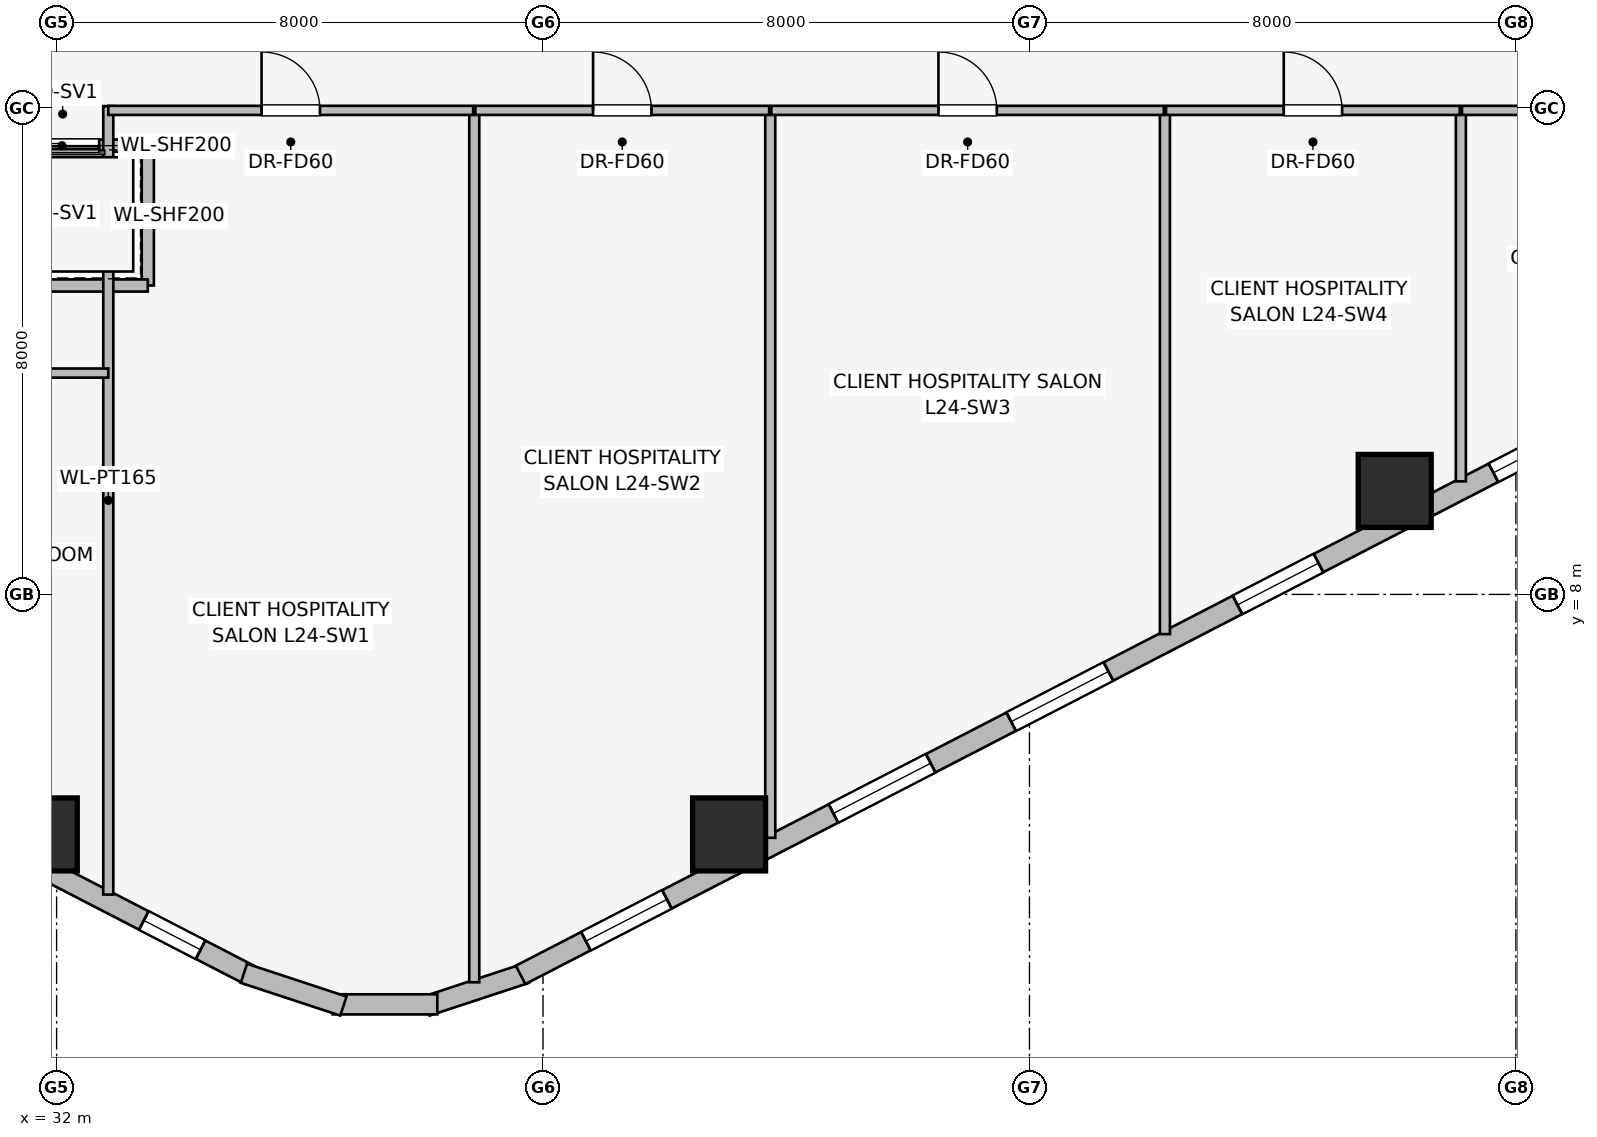
"""IFC4 building model, lengths in metres.
Left out: names, types, materials, properties, quantities, classifications, styles, units other than length and angle.
Written with IfcOpenShell. Run it as: python <this file> out.ifc"""

import sys

from ifc_helpers import new_model, si_unit, direction, frame, frame_2d, origin, origin_2d, place, context, subcontext, project, spatial, rectangle, extrude, element, fill, save


model = new_model("IFC4")
c1 = context("Model", 3, precision=1e-05, world=origin(), true_north=direction((0.0, 1.0)))
c2 = subcontext(c1, "Body", "Model", "MODEL_VIEW")
j1 = project(units=[si_unit("LENGTHUNIT", "METRE"), si_unit("PLANEANGLEUNIT", "RADIAN")], contexts=[c1])
p1 = place(None, origin())
s1 = spatial("IfcSite", under=j1, at=p1, CompositionType="ELEMENT")
p2 = place(p1, origin())
s2 = spatial("IfcBuilding", under=s1, at=p2, CompositionType="ELEMENT")
p3 = place(p2, frame((0.0, 0.0, 92.7)))
s3 = spatial("IfcBuildingStorey", under=s2, at=p3, CompositionType="ELEMENT", Elevation=92.7)
for number, where, z_axis, x_axis in (
    (1, (31.74, 4.053, 0.0), (0.0, 0.0, 1.0), (1.0, 0.0, 0.0)),
    (2, (43.06, 4.053, 0.0), (0.0, 0.0, 1.0), (1.0, 0.0, 0.0)),
    (3, (54.007, 9.702, 0.0), (0.0, 0.0, 1.0), (1.0, 0.0, 0.0)),
):
    element("IfcColumn", number, at=place(p3, frame(where, z_axis=z_axis, x_axis=x_axis)), inside=s3, PredefinedType="COLUMN", context=c2, shape_type="SweptSolid", body=[
        extrude(rectangle(XDim=1.2, YDim=1.2, at=origin_2d()), origin(), (0.0, 0.0, 1.0), 3.65),
    ])
p4 = place(p3, frame((35.169, 1.743, 0.0), z_axis=(0.0, 0.0, 1.0), x_axis=(-0.888634413993, 0.458616264721, 0.0)))
e4 = element("IfcWall", 4, at=p4, inside=s3, PredefinedType="STANDARD", context=c2, shape_type="SweptSolid", body=[
    extrude(rectangle(XDim=20.531, YDim=0.34, at=frame_2d((10.266, 0.0))), origin(), (0.0, 0.0, 1.0), 2.634),
])
p5 = place(p4, frame((0.902, 0.0, 0.75)))
e5 = element("IfcOpeningElement", 5, at=p5, cuts=e4, PredefinedType="OPENING", context=c2, shape_type="SweptSolid", body=[
    extrude(rectangle(XDim=1.05, YDim=1.4, at=frame_2d((0.525, 0.7))), frame((0.0, 0.18, 0.0), z_axis=(0.0, -1.0, 0.0), x_axis=(1.0, 0.0, 0.0)), (0.0, 0.0, 1.0), 0.36),
])
p6 = place(p4, frame((5.903, 0.0, 0.75)))
e6 = element("IfcOpeningElement", 6, at=p6, cuts=e4, PredefinedType="OPENING", context=c2, shape_type="SweptSolid", body=[
    extrude(rectangle(XDim=1.5, YDim=1.5, at=frame_2d((0.75, 0.75))), frame((0.0, 0.18, 0.0), z_axis=(0.0, -1.0, 0.0), x_axis=(1.0, 0.0, 0.0)), (0.0, 0.0, 1.0), 0.36),
])
p7 = place(p4, frame((9.516, 0.0, 0.75)))
e7 = element("IfcOpeningElement", 7, at=p7, cuts=e4, PredefinedType="OPENING", context=c2, shape_type="SweptSolid", body=[
    extrude(rectangle(XDim=1.5, YDim=1.5, at=frame_2d((0.75, 0.75))), frame((0.0, 0.18, 0.0), z_axis=(0.0, -1.0, 0.0), x_axis=(1.0, 0.0, 0.0)), (0.0, 0.0, 1.0), 0.36),
])
p8 = place(p4, frame((13.129, 0.0, 0.75)))
e8 = element("IfcOpeningElement", 8, at=p8, cuts=e4, PredefinedType="OPENING", context=c2, shape_type="SweptSolid", body=[
    extrude(rectangle(XDim=1.5, YDim=1.5, at=frame_2d((0.75, 0.75))), frame((0.0, 0.18, 0.0), z_axis=(0.0, -1.0, 0.0), x_axis=(1.0, 0.0, 0.0)), (0.0, 0.0, 1.0), 0.36),
])
p9 = place(p4, frame((17.673, 0.0, 0.75)))
e9 = element("IfcOpeningElement", 9, at=p9, cuts=e4, PredefinedType="OPENING", context=c2, shape_type="SweptSolid", body=[
    extrude(rectangle(XDim=1.8, YDim=1.5, at=frame_2d((0.9, 0.75))), frame((0.0, 0.18, 0.0), z_axis=(0.0, -1.0, 0.0), x_axis=(1.0, 0.0, 0.0)), (0.0, 0.0, 1.0), 0.36),
])
p10 = place(p3, frame((39.719, 1.769, 0.0), z_axis=(0.0, 0.0, 1.0), x_axis=(-0.94976901097, -0.312951794691, 0.0)))
e10 = element("IfcWall", 10, at=p10, inside=s3, PredefinedType="STANDARD", context=c2, shape_type="SweptSolid", body=[
    extrude(rectangle(XDim=1.722, YDim=0.33, at=frame_2d((0.861, 0.0))), origin(), (0.0, 0.0, 1.0), 3.34),
])
p11 = place(p3, frame((38.261, 1.259, 0.0), z_axis=(0.0, 0.0, 1.0), x_axis=(-1.0, 0.0, 0.0)))
e11 = element("IfcWall", 11, at=p11, inside=s3, PredefinedType="STANDARD", context=c2, shape_type="SweptSolid", body=[
    extrude(rectangle(XDim=1.722, YDim=0.33, at=frame_2d((0.861, 0.0))), origin(), (0.0, 0.0, 1.0), 3.34),
])
p12 = place(p3, frame((36.717, 1.23, 0.0), z_axis=(0.0, 0.0, 1.0), x_axis=(-0.94976901097, 0.312951794691, 0.0)))
e12 = element("IfcWall", 12, at=p12, inside=s3, PredefinedType="STANDARD", context=c2, shape_type="SweptSolid", body=[
    extrude(rectangle(XDim=1.722, YDim=0.33, at=frame_2d((0.861, 0.0))), origin(), (0.0, 0.0, 1.0), 3.34),
])
p13 = place(p3, frame((57.876, 11.159, 0.0), z_axis=(0.0, 0.0, 1.0), x_axis=(-0.888634413993, -0.458616264721, 0.0)))
e13 = element("IfcWall", 13, at=p13, inside=s3, PredefinedType="STANDARD", context=c2, shape_type="SweptSolid", body=[
    extrude(rectangle(XDim=20.531, YDim=0.34, at=frame_2d((10.266, 0.0))), origin(), (0.0, 0.0, 1.0), 2.634),
])
p14 = place(p13, frame((0.727, 0.0, 0.75)))
e14 = element("IfcOpeningElement", 14, at=p14, cuts=e13, PredefinedType="OPENING", context=c2, shape_type="SweptSolid", body=[
    extrude(rectangle(XDim=1.8, YDim=1.5, at=frame_2d((0.9, 0.75))), frame((0.0, 0.18, 0.0), z_axis=(0.0, -1.0, 0.0), x_axis=(1.0, 0.0, 0.0)), (0.0, 0.0, 1.0), 0.36),
])
p15 = place(p13, frame((5.764, 0.0, 0.75)))
e15 = element("IfcOpeningElement", 15, at=p15, cuts=e13, PredefinedType="OPENING", context=c2, shape_type="SweptSolid", body=[
    extrude(rectangle(XDim=1.5, YDim=1.5, at=frame_2d((0.75, 0.75))), frame((0.0, 0.18, 0.0), z_axis=(0.0, -1.0, 0.0), x_axis=(1.0, 0.0, 0.0)), (0.0, 0.0, 1.0), 0.36),
])
p16 = place(p13, frame((9.652, 0.0, 0.75)))
e16 = element("IfcOpeningElement", 16, at=p16, cuts=e13, PredefinedType="OPENING", context=c2, shape_type="SweptSolid", body=[
    extrude(rectangle(XDim=1.8, YDim=1.5, at=frame_2d((0.9, 0.75))), frame((0.0, 0.18, 0.0), z_axis=(0.0, -1.0, 0.0), x_axis=(1.0, 0.0, 0.0)), (0.0, 0.0, 1.0), 0.36),
])
p17 = place(p13, frame((12.942, 0.0, 0.75)))
e17 = element("IfcOpeningElement", 17, at=p17, cuts=e13, PredefinedType="OPENING", context=c2, shape_type="SweptSolid", body=[
    extrude(rectangle(XDim=1.8, YDim=1.5, at=frame_2d((0.9, 0.75))), frame((0.0, 0.18, 0.0), z_axis=(0.0, -1.0, 0.0), x_axis=(1.0, 0.0, 0.0)), (0.0, 0.0, 1.0), 0.36),
])
p18 = place(p13, frame((17.823, 0.0, 0.75)))
e18 = element("IfcOpeningElement", 18, at=p18, cuts=e13, PredefinedType="OPENING", context=c2, shape_type="SweptSolid", body=[
    extrude(rectangle(XDim=1.5, YDim=1.5, at=frame_2d((0.75, 0.75))), frame((0.0, 0.18, 0.0), z_axis=(0.0, -1.0, 0.0), x_axis=(1.0, 0.0, 0.0)), (0.0, 0.0, 1.0), 0.36),
])
p19 = place(p3, frame((33.5, 15.38, 0.0), z_axis=(0.0, 0.0, 1.0), x_axis=(-1.0, 0.0, 0.0)))
e19 = element("IfcWall", 19, at=p19, inside=s3, PredefinedType="PARTITIONING", context=c2, shape_type="SweptSolid", body=[
    extrude(rectangle(XDim=2.82, YDim=0.2, at=frame_2d((1.41, 0.0))), origin(), (0.0, 0.0, 1.0), 3.34),
])
p20 = place(p19, frame((0.8, 0.0, 0.0)))
e20 = element("IfcOpeningElement", 20, at=p20, cuts=e19, PredefinedType="OPENING", context=c2, shape_type="SweptSolid", body=[
    extrude(rectangle(XDim=1.2, YDim=2.2, at=frame_2d((0.6, 1.1))), frame((0.0, 0.11, 0.0), z_axis=(0.0, -1.0, 0.0), x_axis=(1.0, 0.0, 0.0)), (0.0, 0.0, 1.0), 0.22),
])
p21 = place(p3, frame((33.5, 13.08, 0.0), z_axis=(0.0, 0.0, 1.0), x_axis=(0.0, 1.0, 0.0)))
e21 = element("IfcWall", 21, at=p21, inside=s3, PredefinedType="PARTITIONING", context=c2, shape_type="SweptSolid", body=[
    extrude(rectangle(XDim=2.3, YDim=0.2, at=frame_2d((1.15, 0.0))), origin(), (0.0, 0.0, 1.0), 3.34),
])
p22 = place(p3, frame((30.879, 13.08, 0.0), z_axis=(0.0, 0.0, 1.0), x_axis=(1.0, 0.0, 0.0)))
e22 = element("IfcWall", 22, at=p22, inside=s3, PredefinedType="PARTITIONING", context=c2, shape_type="SweptSolid", body=[
    extrude(rectangle(XDim=2.621, YDim=0.2, at=frame_2d((1.311, 0.0))), origin(), (0.0, 0.0, 1.0), 3.34),
])
p23 = place(p3, frame((32.85, 3.064, 0.0), z_axis=(0.0, 0.0, 1.0), x_axis=(0.0, 1.0, 0.0)))
e23 = element("IfcWall", 23, at=p23, inside=s3, PredefinedType="PARTITIONING", context=c2, shape_type="SweptSolid", body=[
    extrude(rectangle(XDim=12.966, YDim=0.165, at=frame_2d((6.483, 0.0))), origin(), (0.0, 0.0, 1.0), 3.34),
])
p24 = place(p3, frame((16.487, 11.64, 0.0), z_axis=(0.0, 0.0, 1.0), x_axis=(1.0, 0.0, 0.0)))
e24 = element("IfcWall", 24, at=p24, inside=s3, PredefinedType="PARTITIONING", context=c2, shape_type="SweptSolid", body=[
    extrude(rectangle(XDim=16.363, YDim=0.15, at=frame_2d((8.182, 0.0))), origin(), (0.0, 0.0, 1.0), 3.34),
])
p25 = place(p24, frame((6.513, 0.0, 0.0)))
e25 = element("IfcOpeningElement", 25, at=p25, cuts=e24, PredefinedType="OPENING", context=c2, shape_type="SweptSolid", body=[
    extrude(rectangle(XDim=0.9, YDim=2.0, at=frame_2d((0.45, 1.0))), frame((0.0, 0.085, 0.0), z_axis=(0.0, -1.0, 0.0), x_axis=(1.0, 0.0, 0.0)), (0.0, 0.0, 1.0), 0.17),
])
p26 = place(p3, frame((38.869, 1.621, 0.0), z_axis=(0.0, 0.0, 1.0), x_axis=(0.0, 1.0, 0.0)))
e26 = element("IfcWall", 26, at=p26, inside=s3, PredefinedType="PARTITIONING", context=c2, shape_type="SweptSolid", body=[
    extrude(rectangle(XDim=14.309, YDim=0.165, at=frame_2d((7.154, 0.0))), origin(), (0.0, 0.0, 1.0), 3.34),
])
p27 = place(p3, frame((43.737, 3.997, 0.0), z_axis=(0.0, 0.0, 1.0), x_axis=(0.0, 1.0, 0.0)))
e27 = element("IfcWall", 27, at=p27, inside=s3, PredefinedType="PARTITIONING", context=c2, shape_type="SweptSolid", body=[
    extrude(rectangle(XDim=11.933, YDim=0.165, at=frame_2d((5.966, 0.0))), origin(), (0.0, 0.0, 1.0), 3.34),
])
p28 = place(p3, frame((50.228, 7.347, 0.0), z_axis=(0.0, 0.0, 1.0), x_axis=(0.0, 1.0, 0.0)))
e28 = element("IfcWall", 28, at=p28, inside=s3, PredefinedType="PARTITIONING", context=c2, shape_type="SweptSolid", body=[
    extrude(rectangle(XDim=8.583, YDim=0.165, at=frame_2d((4.292, 0.0))), origin(), (0.0, 0.0, 1.0), 3.34),
])
p29 = place(p3, frame((55.095, 9.859, 0.0), z_axis=(0.0, 0.0, 1.0), x_axis=(0.0, 1.0, 0.0)))
e29 = element("IfcWall", 29, at=p29, inside=s3, PredefinedType="PARTITIONING", context=c2, shape_type="SweptSolid", body=[
    extrude(rectangle(XDim=6.071, YDim=0.165, at=frame_2d((3.036, 0.0))), origin(), (0.0, 0.0, 1.0), 3.34),
])
p30 = place(p3, frame((32.85, 15.96, 0.0), z_axis=(0.0, 0.0, 1.0), x_axis=(1.0, 0.0, 0.0)))
e30 = element("IfcWall", 30, at=p30, inside=s3, PredefinedType="PARTITIONING", context=c2, shape_type="SweptSolid", body=[
    extrude(rectangle(XDim=6.001, YDim=0.15, at=frame_2d((3.0, 0.0))), origin(), (0.0, 0.0, 1.0), 3.34),
])
p31 = place(p30, frame((2.521, 0.0, 0.0)))
e31 = element("IfcOpeningElement", 31, at=p31, cuts=e30, PredefinedType="OPENING", context=c2, shape_type="SweptSolid", body=[
    extrude(rectangle(XDim=0.96, YDim=2.0, at=frame_2d((0.48, 1.0))), frame((0.0, 0.085, 0.0), z_axis=(0.0, -1.0, 0.0), x_axis=(1.0, 0.0, 0.0)), (0.0, 0.0, 1.0), 0.17),
])
p32 = place(p3, frame((38.887, 15.96, 0.0), z_axis=(0.0, 0.0, 1.0), x_axis=(1.0, 0.0, 0.0)))
e32 = element("IfcWall", 32, at=p32, inside=s3, PredefinedType="PARTITIONING", context=c2, shape_type="SweptSolid", body=[
    extrude(rectangle(XDim=4.832, YDim=0.15, at=frame_2d((2.416, 0.0))), origin(), (0.0, 0.0, 1.0), 3.34),
])
p33 = place(p32, frame((1.936, 0.0, 0.0)))
e33 = element("IfcOpeningElement", 33, at=p33, cuts=e32, PredefinedType="OPENING", context=c2, shape_type="SweptSolid", body=[
    extrude(rectangle(XDim=0.96, YDim=2.0, at=frame_2d((0.48, 1.0))), frame((0.0, 0.085, 0.0), z_axis=(0.0, -1.0, 0.0), x_axis=(1.0, 0.0, 0.0)), (0.0, 0.0, 1.0), 0.17),
])
p34 = place(p3, frame((43.755, 15.96, 0.0), z_axis=(0.0, 0.0, 1.0), x_axis=(1.0, 0.0, 0.0)))
e34 = element("IfcWall", 34, at=p34, inside=s3, PredefinedType="PARTITIONING", context=c2, shape_type="SweptSolid", body=[
    extrude(rectangle(XDim=6.455, YDim=0.15, at=frame_2d((3.228, 0.0))), origin(), (0.0, 0.0, 1.0), 3.34),
])
p35 = place(p34, frame((2.748, 0.0, 0.0)))
e35 = element("IfcOpeningElement", 35, at=p35, cuts=e34, PredefinedType="OPENING", context=c2, shape_type="SweptSolid", body=[
    extrude(rectangle(XDim=0.96, YDim=2.0, at=frame_2d((0.48, 1.0))), frame((0.0, 0.085, 0.0), z_axis=(0.0, -1.0, 0.0), x_axis=(1.0, 0.0, 0.0)), (0.0, 0.0, 1.0), 0.17),
])
p36 = place(p3, frame((50.246, 15.96, 0.0), z_axis=(0.0, 0.0, 1.0), x_axis=(1.0, 0.0, 0.0)))
e36 = element("IfcWall", 36, at=p36, inside=s3, PredefinedType="PARTITIONING", context=c2, shape_type="SweptSolid", body=[
    extrude(rectangle(XDim=4.831, YDim=0.15, at=frame_2d((2.416, 0.0))), origin(), (0.0, 0.0, 1.0), 3.34),
])
p37 = place(p36, frame((1.936, 0.0, 0.0)))
e37 = element("IfcOpeningElement", 37, at=p37, cuts=e36, PredefinedType="OPENING", context=c2, shape_type="SweptSolid", body=[
    extrude(rectangle(XDim=0.96, YDim=2.0, at=frame_2d((0.48, 1.0))), frame((0.0, 0.085, 0.0), z_axis=(0.0, -1.0, 0.0), x_axis=(1.0, 0.0, 0.0)), (0.0, 0.0, 1.0), 0.17),
])
p38 = place(p3, frame((55.113, 15.96, 0.0), z_axis=(0.0, 0.0, 1.0), x_axis=(1.0, 0.0, 0.0)))
e38 = element("IfcWall", 38, at=p38, inside=s3, PredefinedType="PARTITIONING", context=c2, shape_type="SweptSolid", body=[
    extrude(rectangle(XDim=5.14, YDim=0.15, at=frame_2d((2.57, 0.0))), origin(), (0.0, 0.0, 1.0), 3.34),
])
p39 = place(p38, frame((2.104, 0.0, 0.0)))
e39 = element("IfcOpeningElement", 39, at=p39, cuts=e38, PredefinedType="OPENING", context=c2, shape_type="SweptSolid", body=[
    extrude(rectangle(XDim=0.96, YDim=2.0, at=frame_2d((0.48, 1.0))), frame((0.0, 0.085, 0.0), z_axis=(0.0, -1.0, 0.0), x_axis=(1.0, 0.0, 0.0)), (0.0, 0.0, 1.0), 0.17),
])
p40 = place(p5, origin())
e40 = element("IfcWindow", 40, at=p40, inside=s3, PartitioningType="SINGLE_PANEL", PredefinedType="WINDOW", context=c2, shape_type="SweptSolid", body=[
    extrude(rectangle(XDim=1.05, YDim=1.4, at=frame_2d((0.525, 0.7))), frame((0.0, 0.03, 0.0), z_axis=(0.0, -1.0, 0.0), x_axis=(1.0, 0.0, 0.0)), (0.0, 0.0, 1.0), 0.06),
])
fill(e5, e40)
p41 = place(p14, origin())
e41 = element("IfcWindow", 41, at=p41, inside=s3, PartitioningType="SINGLE_PANEL", PredefinedType="WINDOW", context=c2, shape_type="SweptSolid", body=[
    extrude(rectangle(XDim=1.8, YDim=1.5, at=frame_2d((0.9, 0.75))), frame((0.0, 0.03, 0.0), z_axis=(0.0, -1.0, 0.0), x_axis=(1.0, 0.0, 0.0)), (0.0, 0.0, 1.0), 0.06),
])
fill(e14, e41)
p42 = place(p15, origin())
e42 = element("IfcWindow", 42, at=p42, inside=s3, PartitioningType="SINGLE_PANEL", PredefinedType="WINDOW", context=c2, shape_type="SweptSolid", body=[
    extrude(rectangle(XDim=1.5, YDim=1.5, at=frame_2d((0.75, 0.75))), frame((0.0, 0.03, 0.0), z_axis=(0.0, -1.0, 0.0), x_axis=(1.0, 0.0, 0.0)), (0.0, 0.0, 1.0), 0.06),
])
fill(e15, e42)
p43 = place(p16, origin())
e43 = element("IfcWindow", 43, at=p43, inside=s3, PartitioningType="SINGLE_PANEL", PredefinedType="WINDOW", context=c2, shape_type="SweptSolid", body=[
    extrude(rectangle(XDim=1.8, YDim=1.5, at=frame_2d((0.9, 0.75))), frame((0.0, 0.03, 0.0), z_axis=(0.0, -1.0, 0.0), x_axis=(1.0, 0.0, 0.0)), (0.0, 0.0, 1.0), 0.06),
])
fill(e16, e43)
p44 = place(p17, origin())
e44 = element("IfcWindow", 44, at=p44, inside=s3, PartitioningType="SINGLE_PANEL", PredefinedType="WINDOW", context=c2, shape_type="SweptSolid", body=[
    extrude(rectangle(XDim=1.8, YDim=1.5, at=frame_2d((0.9, 0.75))), frame((0.0, 0.03, 0.0), z_axis=(0.0, -1.0, 0.0), x_axis=(1.0, 0.0, 0.0)), (0.0, 0.0, 1.0), 0.06),
])
fill(e17, e44)
p45 = place(p18, origin())
e45 = element("IfcWindow", 45, at=p45, inside=s3, PartitioningType="SINGLE_PANEL", PredefinedType="WINDOW", context=c2, shape_type="SweptSolid", body=[
    extrude(rectangle(XDim=1.5, YDim=1.5, at=frame_2d((0.75, 0.75))), frame((0.0, 0.03, 0.0), z_axis=(0.0, -1.0, 0.0), x_axis=(1.0, 0.0, 0.0)), (0.0, 0.0, 1.0), 0.06),
])
fill(e18, e45)
p46 = place(p20, origin())
e46 = element("IfcDoor", 46, at=p46, inside=s3, OperationType="SLIDING_TO_RIGHT", PredefinedType="DOOR", context=c2, shape_type="SweptSolid", body=[
    extrude(rectangle(XDim=1.2, YDim=2.2, at=frame_2d((0.6, 1.1))), frame((0.0, 0.025, 0.0), z_axis=(0.0, -1.0, 0.0), x_axis=(1.0, 0.0, 0.0)), (0.0, 0.0, 1.0), 0.05),
])
fill(e20, e46)
p47 = place(p31, origin())
e47 = element("IfcDoor", 47, at=p47, inside=s3, OperationType="SINGLE_SWING_LEFT", PredefinedType="DOOR", context=c2, shape_type="SweptSolid", body=[
    extrude(rectangle(XDim=0.96, YDim=2.0, at=frame_2d((0.48, 1.0))), frame((0.0, 0.025, 0.0), z_axis=(0.0, -1.0, 0.0), x_axis=(1.0, 0.0, 0.0)), (0.0, 0.0, 1.0), 0.05),
])
fill(e31, e47)
p48 = place(p33, origin())
e48 = element("IfcDoor", 48, at=p48, inside=s3, OperationType="SINGLE_SWING_LEFT", PredefinedType="DOOR", context=c2, shape_type="SweptSolid", body=[
    extrude(rectangle(XDim=0.96, YDim=2.0, at=frame_2d((0.48, 1.0))), frame((0.0, 0.025, 0.0), z_axis=(0.0, -1.0, 0.0), x_axis=(1.0, 0.0, 0.0)), (0.0, 0.0, 1.0), 0.05),
])
fill(e33, e48)
p49 = place(p35, origin())
e49 = element("IfcDoor", 49, at=p49, inside=s3, OperationType="SINGLE_SWING_LEFT", PredefinedType="DOOR", context=c2, shape_type="SweptSolid", body=[
    extrude(rectangle(XDim=0.96, YDim=2.0, at=frame_2d((0.48, 1.0))), frame((0.0, 0.025, 0.0), z_axis=(0.0, -1.0, 0.0), x_axis=(1.0, 0.0, 0.0)), (0.0, 0.0, 1.0), 0.05),
])
fill(e35, e49)
p50 = place(p37, origin())
e50 = element("IfcDoor", 50, at=p50, inside=s3, OperationType="SINGLE_SWING_LEFT", PredefinedType="DOOR", context=c2, shape_type="SweptSolid", body=[
    extrude(rectangle(XDim=0.96, YDim=2.0, at=frame_2d((0.48, 1.0))), frame((0.0, 0.025, 0.0), z_axis=(0.0, -1.0, 0.0), x_axis=(1.0, 0.0, 0.0)), (0.0, 0.0, 1.0), 0.05),
])
fill(e37, e50)
save(model, sys.argv[1])
